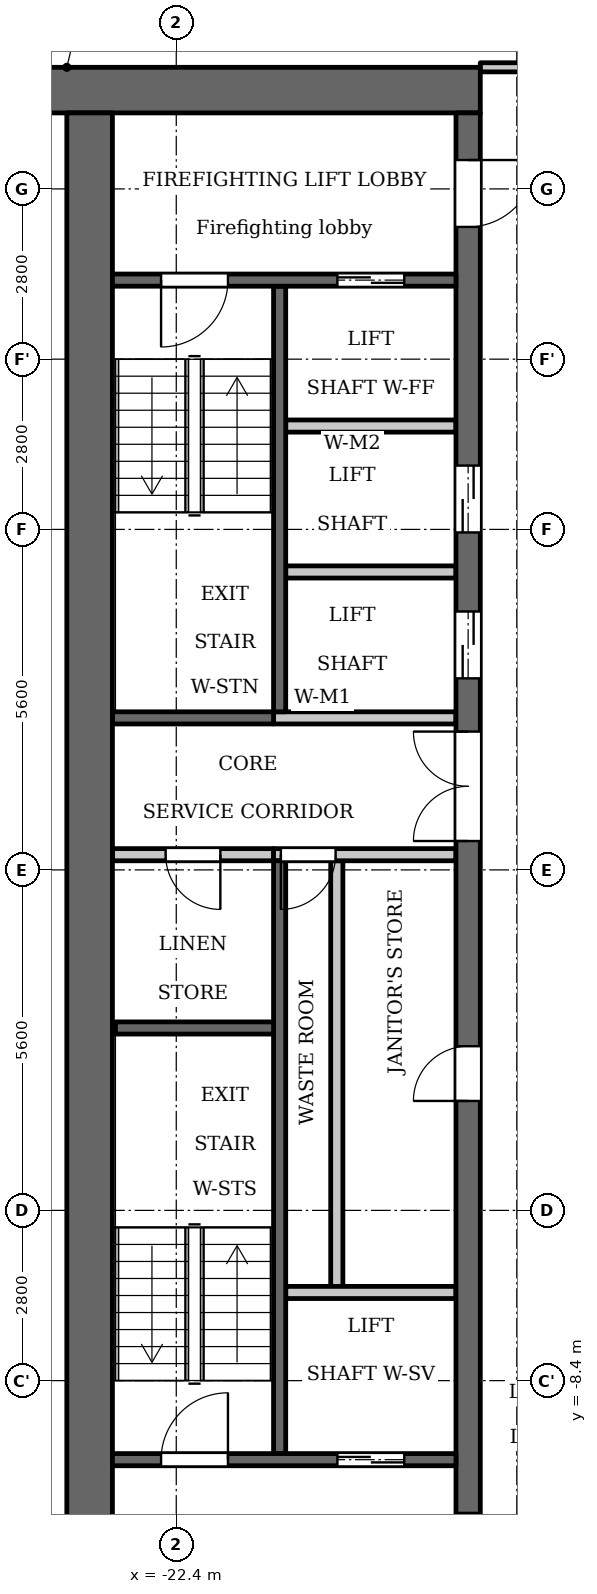
"""IFC4 building model, lengths in metres.
Left out: names, types, materials, properties, quantities, classifications, styles, units other than length and angle.
Written with IfcOpenShell. Run it as: python <this file> out.ifc"""

import sys

from ifc_helpers import new_model, si_unit, direction, frame, frame_2d, origin, place, context, subcontext, project, spatial, rectangle, extrude, element, fill, save


model = new_model("IFC4")
c1 = context("Model", 3, precision=1e-05, world=origin(), true_north=direction((0.0, 1.0)))
c2 = subcontext(c1, "Body", "Model", "MODEL_VIEW")
j1 = project(units=[si_unit("LENGTHUNIT", "METRE"), si_unit("PLANEANGLEUNIT", "RADIAN")], contexts=[c1])
p1 = place(None, origin())
s1 = spatial("IfcSite", under=j1, at=p1, CompositionType="ELEMENT")
p2 = place(p1, origin())
s2 = spatial("IfcBuilding", under=s1, at=p2, CompositionType="ELEMENT")
p3 = place(p2, frame((0.0, 0.0, 209.9)))
s3 = spatial("IfcBuildingStorey", under=s2, at=p3, CompositionType="ELEMENT", Elevation=209.9)
p4 = place(p3, frame((-20.7, 2.6, 0.0), z_axis=(0.0, 0.0, 1.0), x_axis=(0.0, 1.0, 0.0)))
e1 = element("IfcWall", 1, at=p4, inside=s3, PredefinedType="SHEAR", context=c2, shape_type="SweptSolid", body=[
    extrude(rectangle(XDim=7.0, YDim=0.2, at=frame_2d((3.5, 0.0))), origin(), (0.0, 0.0, 1.0), 3.2),
])
p5 = place(p3, frame((-20.7, -9.6, 0.0), z_axis=(0.0, 0.0, 1.0), x_axis=(0.0, 1.0, 0.0)))
e2 = element("IfcWall", 2, at=p5, inside=s3, PredefinedType="SHEAR", context=c2, shape_type="SweptSolid", body=[
    extrude(rectangle(XDim=9.75, YDim=0.2, at=frame_2d((4.875, 0.0))), origin(), (0.0, 0.0, 1.0), 3.2),
])
p6 = place(p3, frame((-20.8, 2.5, 0.0), z_axis=(0.0, 0.0, 1.0), x_axis=(-1.0, 0.0, 0.0)))
e3 = element("IfcWall", 3, at=p6, inside=s3, PredefinedType="SHEAR", context=c2, shape_type="SweptSolid", body=[
    extrude(rectangle(XDim=2.65, YDim=0.2, at=frame_2d((1.325, 0.0))), origin(), (0.0, 0.0, 1.0), 3.2),
])
p7 = place(p3, frame((-20.8, 0.25, 0.0), z_axis=(0.0, 0.0, 1.0), x_axis=(-1.0, 0.0, 0.0)))
e4 = element("IfcWall", 4, at=p7, inside=s3, PredefinedType="PARTITIONING", context=c2, shape_type="SweptSolid", body=[
    extrude(rectangle(XDim=2.65, YDim=0.2, at=frame_2d((1.325, 0.0))), origin(), (0.0, 0.0, 1.0), 3.2),
])
p8 = place(p7, frame((0.875, 0.0, 0.0)))
e5 = element("IfcOpeningElement", 5, at=p8, cuts=e4, PredefinedType="OPENING", context=c2, shape_type="SweptSolid", body=[
    extrude(rectangle(XDim=0.9, YDim=2.1, at=frame_2d((0.45, 1.05))), frame((0.0, 0.11, 0.0), z_axis=(0.0, -1.0, 0.0), x_axis=(1.0, 0.0, 0.0)), (0.0, 0.0, 1.0), 0.22),
])
p9 = place(p3, frame((-17.4, 12.825, 0.0), z_axis=(0.0, 0.0, 1.0), x_axis=(-1.0, 0.0, 0.0)))
e6 = element("IfcWall", 6, at=p9, inside=s3, PredefinedType="SHEAR", context=c2, shape_type="SweptSolid", body=[
    extrude(rectangle(XDim=7.6, YDim=0.75, at=frame_2d((3.8, 0.0))), origin(), (0.0, 0.0, 1.0), 3.2),
])
p10 = place(p3, frame((-19.76, -6.85, 0.0), z_axis=(0.0, 0.0, 1.0), x_axis=(0.0, 1.0, 0.0)))
e7 = element("IfcWall", 7, at=p10, inside=s3, PredefinedType="PARTITIONING", context=c2, shape_type="SweptSolid", body=[
    extrude(rectangle(XDim=7.0, YDim=0.2, at=frame_2d((3.5, 0.0))), origin(), (0.0, 0.0, 1.0), 3.2),
])
p11 = place(p3, frame((-17.6, -12.45, 0.0), z_axis=(0.0, 0.0, 1.0), x_axis=(0.0, 1.0, 0.0)))
e8 = element("IfcWall", 8, at=p11, inside=s3, PredefinedType="SHEAR", context=c2, shape_type="SweptSolid", body=[
    extrude(rectangle(XDim=24.9, YDim=0.4, at=frame_2d((12.45, 0.0))), origin(), (0.0, 0.0, 1.0), 3.2),
])
p12 = place(p11, frame((8.65, 0.0, 0.0)))
e9 = element("IfcOpeningElement", 9, at=p12, cuts=e8, PredefinedType="OPENING", context=c2, shape_type="SweptSolid", body=[
    extrude(rectangle(XDim=0.9, YDim=2.1, at=frame_2d((0.45, 1.05))), frame((0.0, 0.21, 0.0), z_axis=(0.0, -1.0, 0.0), x_axis=(1.0, 0.0, 0.0)), (0.0, 0.0, 1.0), 0.42),
])
p13 = place(p11, frame((15.6, 0.0, 0.0)))
e10 = element("IfcOpeningElement", 10, at=p13, cuts=e8, PredefinedType="OPENING", context=c2, shape_type="SweptSolid", body=[
    extrude(rectangle(XDim=1.1, YDim=2.1, at=frame_2d((0.55, 1.05))), frame((0.0, 0.21, 0.0), z_axis=(0.0, -1.0, 0.0), x_axis=(1.0, 0.0, 0.0)), (0.0, 0.0, 1.0), 0.42),
])
p14 = place(p11, frame((18.0, 0.0, 0.0)))
e11 = element("IfcOpeningElement", 11, at=p14, cuts=e8, PredefinedType="OPENING", context=c2, shape_type="SweptSolid", body=[
    extrude(rectangle(XDim=1.1, YDim=2.1, at=frame_2d((0.55, 1.05))), frame((0.0, 0.21, 0.0), z_axis=(0.0, -1.0, 0.0), x_axis=(1.0, 0.0, 0.0)), (0.0, 0.0, 1.0), 0.42),
])
p15 = place(p11, frame((23.025, 0.0, 0.0)))
e12 = element("IfcOpeningElement", 12, at=p15, cuts=e8, PredefinedType="OPENING", context=c2, shape_type="SweptSolid", body=[
    extrude(rectangle(XDim=1.1, YDim=2.1, at=frame_2d((0.55, 1.05))), frame((0.0, 0.21, 0.0), z_axis=(0.0, -1.0, 0.0), x_axis=(1.0, 0.0, 0.0)), (0.0, 0.0, 1.0), 0.42),
])
p16 = place(p11, frame((0.775, 0.0, 0.0)))
e13 = element("IfcOpeningElement", 13, at=p16, cuts=e8, PredefinedType="OPENING", context=c2, shape_type="SweptSolid", body=[
    extrude(rectangle(XDim=1.1, YDim=2.1, at=frame_2d((0.55, 1.05))), frame((0.0, 0.21, 0.0), z_axis=(0.0, -1.0, 0.0), x_axis=(1.0, 0.0, 0.0)), (0.0, 0.0, 1.0), 0.42),
])
p17 = place(p11, frame((12.925, 0.0, 0.0)))
e14 = element("IfcOpeningElement", 14, at=p17, cuts=e8, PredefinedType="OPENING", context=c2, shape_type="SweptSolid", body=[
    extrude(rectangle(XDim=1.8, YDim=2.1, at=frame_2d((0.9, 1.05))), frame((0.0, 0.21, 0.0), z_axis=(0.0, -1.0, 0.0), x_axis=(1.0, 0.0, 0.0)), (0.0, 0.0, 1.0), 0.42),
])
p18 = place(p3, frame((-23.825, -12.45, 0.0), z_axis=(0.0, 0.0, 1.0), x_axis=(0.0, 1.0, 0.0)))
e15 = element("IfcWall", 15, at=p18, inside=s3, PredefinedType="SHEAR", context=c2, shape_type="SweptSolid", body=[
    extrude(rectangle(XDim=24.9, YDim=0.75, at=frame_2d((12.45, 0.0))), origin(), (0.0, 0.0, 1.0), 3.2),
])
p19 = place(p3, frame((-17.8, -9.7, 0.0), z_axis=(0.0, 0.0, 1.0), x_axis=(-1.0, 0.0, 0.0)))
e16 = element("IfcWall", 16, at=p19, inside=s3, PredefinedType="SHEAR", context=c2, shape_type="SweptSolid", body=[
    extrude(rectangle(XDim=5.65, YDim=0.2, at=frame_2d((2.825, 0.0))), origin(), (0.0, 0.0, 1.0), 3.2),
])
p20 = place(p19, frame((0.85, 0.0, 0.0)))
e17 = element("IfcOpeningElement", 17, at=p20, cuts=e16, PredefinedType="OPENING", context=c2, shape_type="SweptSolid", body=[
    extrude(rectangle(XDim=1.1, YDim=2.1, at=frame_2d((0.55, 1.05))), frame((0.0, 0.11, 0.0), z_axis=(0.0, -1.0, 0.0), x_axis=(1.0, 0.0, 0.0)), (0.0, 0.0, 1.0), 0.22),
])
p21 = place(p19, frame((3.75, 0.0, 0.0)))
e18 = element("IfcOpeningElement", 18, at=p21, cuts=e16, PredefinedType="OPENING", context=c2, shape_type="SweptSolid", body=[
    extrude(rectangle(XDim=1.1, YDim=2.1, at=frame_2d((0.55, 1.05))), frame((0.0, 0.11, 0.0), z_axis=(0.0, -1.0, 0.0), x_axis=(1.0, 0.0, 0.0)), (0.0, 0.0, 1.0), 0.22),
])
p22 = place(p3, frame((-17.8, -6.95, 0.0), z_axis=(0.0, 0.0, 1.0), x_axis=(-1.0, 0.0, 0.0)))
e19 = element("IfcWall", 19, at=p22, inside=s3, PredefinedType="PARTITIONING", context=c2, shape_type="SweptSolid", body=[
    extrude(rectangle(XDim=2.8, YDim=0.2, at=frame_2d((1.4, 0.0))), origin(), (0.0, 0.0, 1.0), 3.2),
])
p23 = place(p3, frame((-17.8, 0.25, 0.0), z_axis=(0.0, 0.0, 1.0), x_axis=(-1.0, 0.0, 0.0)))
e20 = element("IfcWall", 20, at=p23, inside=s3, PredefinedType="PARTITIONING", context=c2, shape_type="SweptSolid", body=[
    extrude(rectangle(XDim=3.0, YDim=0.2, at=frame_2d((1.5, 0.0))), origin(), (0.0, 0.0, 1.0), 3.2),
])
p24 = place(p23, frame((1.98, 0.0, 0.0)))
e21 = element("IfcOpeningElement", 21, at=p24, cuts=e20, PredefinedType="OPENING", context=c2, shape_type="SweptSolid", body=[
    extrude(rectangle(XDim=0.9, YDim=2.1, at=frame_2d((0.45, 1.05))), frame((0.0, 0.11, 0.0), z_axis=(0.0, -1.0, 0.0), x_axis=(1.0, 0.0, 0.0)), (0.0, 0.0, 1.0), 0.22),
])
p25 = place(p3, frame((-17.8, 2.5, 0.0), z_axis=(0.0, 0.0, 1.0), x_axis=(-1.0, 0.0, 0.0)))
e22 = element("IfcWall", 22, at=p25, inside=s3, PredefinedType="PARTITIONING", context=c2, shape_type="SweptSolid", body=[
    extrude(rectangle(XDim=3.0, YDim=0.2, at=frame_2d((1.5, 0.0))), origin(), (0.0, 0.0, 1.0), 3.2),
])
for number, where, z_axis, x_axis in (
    (23, (-17.8, 4.9, 0.0), (0.0, 0.0, 1.0), (-1.0, 0.0, 0.0)),
    (24, (-17.8, 7.3, 0.0), (0.0, 0.0, 1.0), (-1.0, 0.0, 0.0)),
):
    element("IfcWall", number, at=place(p3, frame(where, z_axis=z_axis, x_axis=x_axis)), inside=s3, PredefinedType="PARTITIONING", context=c2, shape_type="SweptSolid", body=[
        extrude(rectangle(XDim=2.8, YDim=0.2, at=frame_2d((1.4, 0.0))), origin(), (0.0, 0.0, 1.0), 3.2),
    ])
p26 = place(p3, frame((-17.8, 9.7, 0.0), z_axis=(0.0, 0.0, 1.0), x_axis=(-1.0, 0.0, 0.0)))
e25 = element("IfcWall", 25, at=p26, inside=s3, PredefinedType="SHEAR", context=c2, shape_type="SweptSolid", body=[
    extrude(rectangle(XDim=5.65, YDim=0.2, at=frame_2d((2.825, 0.0))), origin(), (0.0, 0.0, 1.0), 3.2),
])
p27 = place(p26, frame((0.85, 0.0, 0.0)))
e26 = element("IfcOpeningElement", 26, at=p27, cuts=e25, PredefinedType="OPENING", context=c2, shape_type="SweptSolid", body=[
    extrude(rectangle(XDim=1.1, YDim=2.1, at=frame_2d((0.55, 1.05))), frame((0.0, 0.11, 0.0), z_axis=(0.0, -1.0, 0.0), x_axis=(1.0, 0.0, 0.0)), (0.0, 0.0, 1.0), 0.22),
])
p28 = place(p26, frame((3.75, 0.0, 0.0)))
e27 = element("IfcOpeningElement", 27, at=p28, cuts=e25, PredefinedType="OPENING", context=c2, shape_type="SweptSolid", body=[
    extrude(rectangle(XDim=1.1, YDim=2.1, at=frame_2d((0.55, 1.05))), frame((0.0, 0.11, 0.0), z_axis=(0.0, -1.0, 0.0), x_axis=(1.0, 0.0, 0.0)), (0.0, 0.0, 1.0), 0.22),
])
p29 = place(p3, frame((-20.8, -2.6, 0.0), z_axis=(0.0, 0.0, 1.0), x_axis=(-1.0, 0.0, 0.0)))
e28 = element("IfcWall", 28, at=p29, inside=s3, PredefinedType="SHEAR", context=c2, shape_type="SweptSolid", body=[
    extrude(rectangle(XDim=2.6, YDim=0.2, at=frame_2d((1.3, 0.0))), origin(), (0.0, 0.0, 1.0), 3.2),
])
p30 = place(p3, frame((-17.4, 13.2, 0.0), z_axis=(0.0, 0.0, 1.0), x_axis=(1.0, 0.0, 0.0)))
e29 = element("IfcWall", 29, at=p30, inside=s3, PredefinedType="PARTITIONING", context=c2, shape_type="SweptSolid", body=[
    extrude(rectangle(XDim=34.8, YDim=0.15, at=frame_2d((17.4, 0.0))), origin(), (0.0, 0.0, 1.0), 3.2),
])
p31 = place(p30, frame((0.75, 0.0, 0.0)))
e30 = element("IfcOpeningElement", 30, at=p31, cuts=e29, PredefinedType="OPENING", context=c2, shape_type="SweptSolid", body=[
    extrude(rectangle(XDim=1.0, YDim=2.1, at=frame_2d((0.5, 1.05))), frame((0.0, 0.085, 0.0), z_axis=(0.0, -1.0, 0.0), x_axis=(1.0, 0.0, 0.0)), (0.0, 0.0, 1.0), 0.17),
])
p32 = place(p30, frame((33.15, 0.0, 0.0)))
e31 = element("IfcOpeningElement", 31, at=p32, cuts=e29, PredefinedType="OPENING", context=c2, shape_type="SweptSolid", body=[
    extrude(rectangle(XDim=1.0, YDim=2.1, at=frame_2d((0.5, 1.05))), frame((0.0, 0.085, 0.0), z_axis=(0.0, -1.0, 0.0), x_axis=(1.0, 0.0, 0.0)), (0.0, 0.0, 1.0), 0.17),
])
p33 = place(p30, frame((12.45, 0.0, 0.0)))
e32 = element("IfcOpeningElement", 32, at=p33, cuts=e29, PredefinedType="OPENING", context=c2, shape_type="SweptSolid", body=[
    extrude(rectangle(XDim=1.0, YDim=2.1, at=frame_2d((0.5, 1.05))), frame((0.0, 0.085, 0.0), z_axis=(0.0, -1.0, 0.0), x_axis=(1.0, 0.0, 0.0)), (0.0, 0.0, 1.0), 0.17),
])
p34 = place(p30, frame((18.05, 0.0, 0.0)))
e33 = element("IfcOpeningElement", 33, at=p34, cuts=e29, PredefinedType="OPENING", context=c2, shape_type="SweptSolid", body=[
    extrude(rectangle(XDim=1.0, YDim=2.1, at=frame_2d((0.5, 1.05))), frame((0.0, 0.085, 0.0), z_axis=(0.0, -1.0, 0.0), x_axis=(1.0, 0.0, 0.0)), (0.0, 0.0, 1.0), 0.17),
])
p35 = place(p20, origin())
e34 = element("IfcDoor", 34, at=p35, inside=s3, OperationType="DOUBLE_DOOR_SLIDING", PredefinedType="DOOR", context=c2, shape_type="SweptSolid", body=[
    extrude(rectangle(XDim=1.1, YDim=2.1, at=frame_2d((0.55, 1.05))), frame((0.0, 0.025, 0.0), z_axis=(0.0, -1.0, 0.0), x_axis=(1.0, 0.0, 0.0)), (0.0, 0.0, 1.0), 0.05),
])
fill(e17, e34)
p36 = place(p12, origin())
e35 = element("IfcDoor", 35, at=p36, inside=s3, OperationType="SINGLE_SWING_RIGHT", PredefinedType="DOOR", context=c2, shape_type="SweptSolid", body=[
    extrude(rectangle(XDim=0.9, YDim=2.1, at=frame_2d((0.45, 1.05))), frame((0.0, 0.025, 0.0), z_axis=(0.0, -1.0, 0.0), x_axis=(1.0, 0.0, 0.0)), (0.0, 0.0, 1.0), 0.05),
])
fill(e9, e35)
p37 = place(p24, origin())
e36 = element("IfcDoor", 36, at=p37, inside=s3, OperationType="SINGLE_SWING_LEFT", PredefinedType="DOOR", context=c2, shape_type="SweptSolid", body=[
    extrude(rectangle(XDim=0.9, YDim=2.1, at=frame_2d((0.45, 1.05))), frame((0.0, 0.025, 0.0), z_axis=(0.0, -1.0, 0.0), x_axis=(1.0, 0.0, 0.0)), (0.0, 0.0, 1.0), 0.05),
])
fill(e21, e36)
p38 = place(p13, origin())
e37 = element("IfcDoor", 37, at=p38, inside=s3, OperationType="DOUBLE_DOOR_SLIDING", PredefinedType="DOOR", context=c2, shape_type="SweptSolid", body=[
    extrude(rectangle(XDim=1.1, YDim=2.1, at=frame_2d((0.55, 1.05))), frame((0.0, 0.025, 0.0), z_axis=(0.0, -1.0, 0.0), x_axis=(1.0, 0.0, 0.0)), (0.0, 0.0, 1.0), 0.05),
])
fill(e10, e37)
p39 = place(p14, origin())
e38 = element("IfcDoor", 38, at=p39, inside=s3, OperationType="DOUBLE_DOOR_SLIDING", PredefinedType="DOOR", context=c2, shape_type="SweptSolid", body=[
    extrude(rectangle(XDim=1.1, YDim=2.1, at=frame_2d((0.55, 1.05))), frame((0.0, 0.025, 0.0), z_axis=(0.0, -1.0, 0.0), x_axis=(1.0, 0.0, 0.0)), (0.0, 0.0, 1.0), 0.05),
])
fill(e11, e38)
p40 = place(p27, origin())
e39 = element("IfcDoor", 39, at=p40, inside=s3, OperationType="DOUBLE_DOOR_SLIDING", PredefinedType="DOOR", context=c2, shape_type="SweptSolid", body=[
    extrude(rectangle(XDim=1.1, YDim=2.1, at=frame_2d((0.55, 1.05))), frame((0.0, 0.025, 0.0), z_axis=(0.0, -1.0, 0.0), x_axis=(1.0, 0.0, 0.0)), (0.0, 0.0, 1.0), 0.05),
])
fill(e26, e39)
p41 = place(p15, origin())
e40 = element("IfcDoor", 40, at=p41, inside=s3, OperationType="SINGLE_SWING_RIGHT", PredefinedType="DOOR", context=c2, shape_type="SweptSolid", body=[
    extrude(rectangle(XDim=1.1, YDim=2.1, at=frame_2d((0.55, 1.05))), frame((0.0, 0.025, 0.0), z_axis=(0.0, -1.0, 0.0), x_axis=(1.0, 0.0, 0.0)), (0.0, 0.0, 1.0), 0.05),
])
fill(e12, e40)
p42 = place(p16, origin())
e41 = element("IfcDoor", 41, at=p42, inside=s3, OperationType="SINGLE_SWING_LEFT", PredefinedType="DOOR", context=c2, shape_type="SweptSolid", body=[
    extrude(rectangle(XDim=1.1, YDim=2.1, at=frame_2d((0.55, 1.05))), frame((0.0, 0.025, 0.0), z_axis=(0.0, -1.0, 0.0), x_axis=(1.0, 0.0, 0.0)), (0.0, 0.0, 1.0), 0.05),
])
fill(e13, e41)
p43 = place(p28, origin())
e42 = element("IfcDoor", 42, at=p43, inside=s3, OperationType="SINGLE_SWING_LEFT", PredefinedType="DOOR", context=c2, shape_type="SweptSolid", body=[
    extrude(rectangle(XDim=1.1, YDim=2.1, at=frame_2d((0.55, 1.05))), frame((0.0, 0.025, 0.0), z_axis=(0.0, -1.0, 0.0), x_axis=(1.0, 0.0, 0.0)), (0.0, 0.0, 1.0), 0.05),
])
fill(e27, e42)
p44 = place(p21, origin())
e43 = element("IfcDoor", 43, at=p44, inside=s3, OperationType="SINGLE_SWING_LEFT", PredefinedType="DOOR", context=c2, shape_type="SweptSolid", body=[
    extrude(rectangle(XDim=1.1, YDim=2.1, at=frame_2d((0.55, 1.05))), frame((0.0, 0.025, 0.0), z_axis=(0.0, -1.0, 0.0), x_axis=(1.0, 0.0, 0.0)), (0.0, 0.0, 1.0), 0.05),
])
fill(e18, e43)
p45 = place(p17, origin())
e44 = element("IfcDoor", 44, at=p45, inside=s3, OperationType="DOUBLE_DOOR_SINGLE_SWING", PredefinedType="DOOR", context=c2, shape_type="SweptSolid", body=[
    extrude(rectangle(XDim=1.8, YDim=2.1, at=frame_2d((0.9, 1.05))), frame((0.0, 0.025, 0.0), z_axis=(0.0, -1.0, 0.0), x_axis=(1.0, 0.0, 0.0)), (0.0, 0.0, 1.0), 0.05),
])
fill(e14, e44)
p46 = place(p8, origin())
e45 = element("IfcDoor", 45, at=p46, inside=s3, OperationType="SINGLE_SWING_RIGHT", PredefinedType="DOOR", context=c2, shape_type="SweptSolid", body=[
    extrude(rectangle(XDim=0.9, YDim=2.1, at=frame_2d((0.45, 1.05))), frame((0.0, 0.025, 0.0), z_axis=(0.0, -1.0, 0.0), x_axis=(1.0, 0.0, 0.0)), (0.0, 0.0, 1.0), 0.05),
])
fill(e5, e45)
save(model, sys.argv[1])
